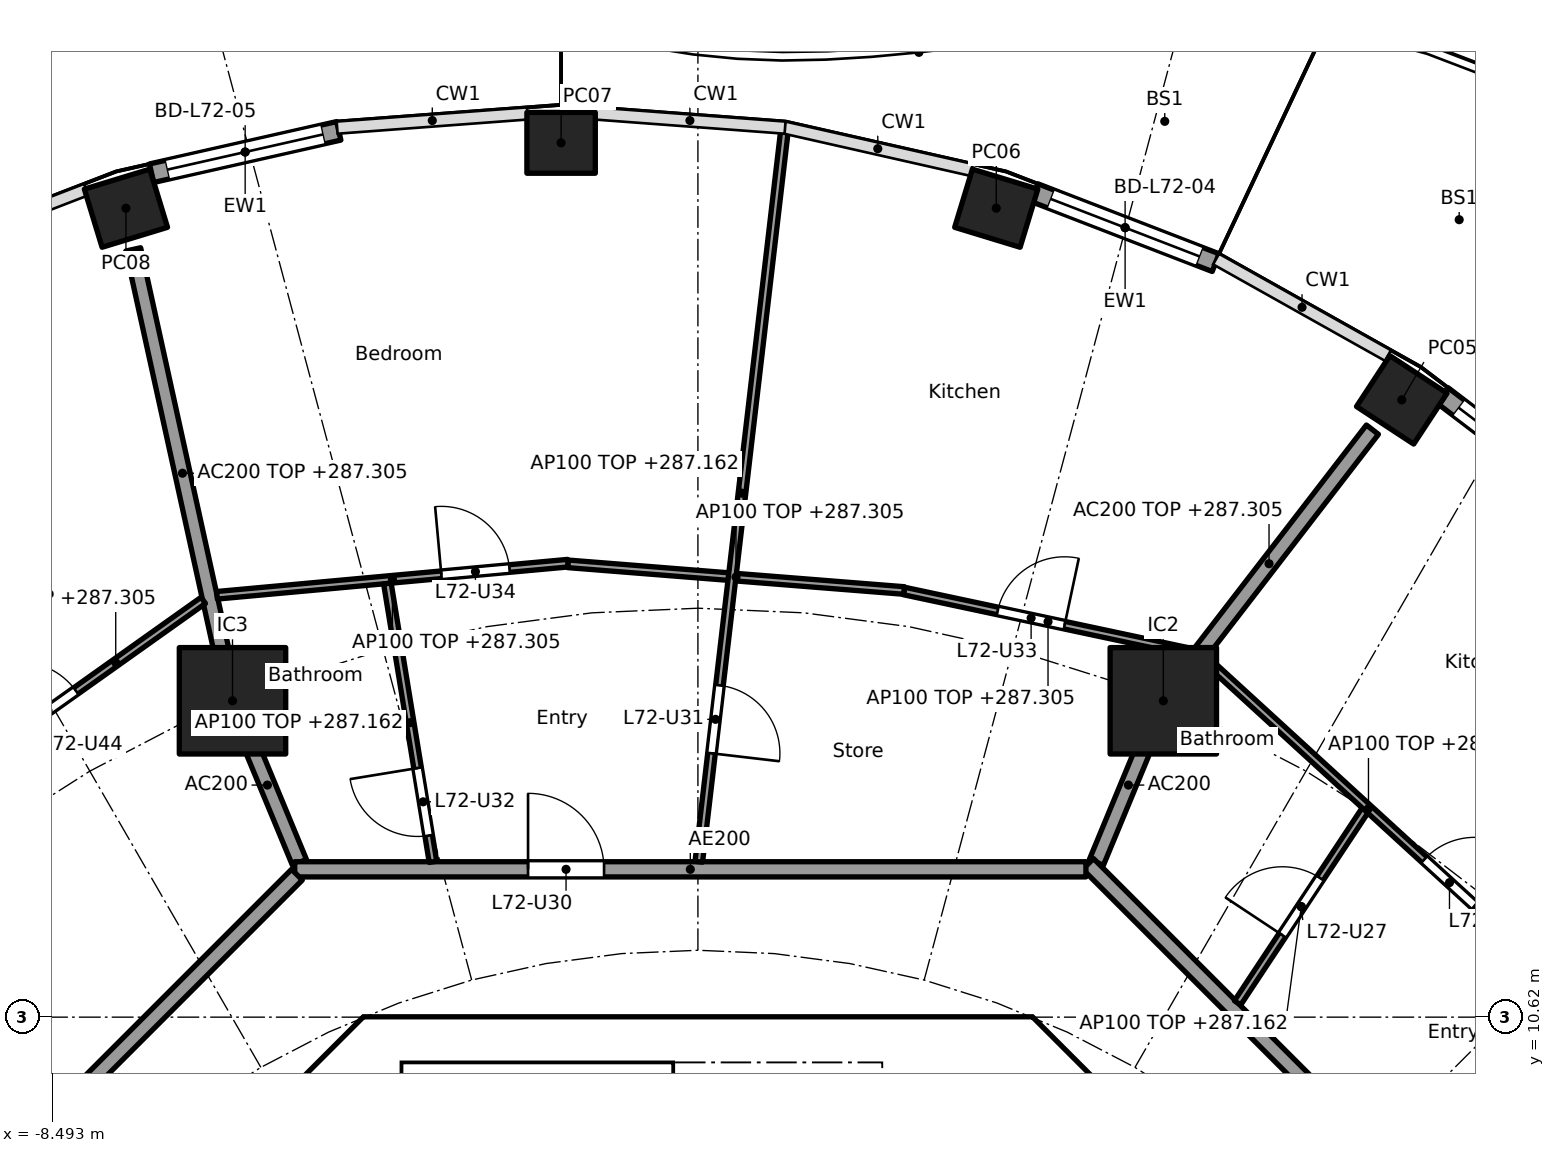
"""IFC4 building model, lengths in metres.
Left out: names, types, materials, properties, quantities, classifications, styles, units other than length and angle.
Written with IfcOpenShell. Run it as: python <this file> out.ifc"""

import sys

from ifc_helpers import new_model, si_unit, direction, frame, frame_2d, origin, origin_2d, place, context, subcontext, project, spatial, polyline, rectangle, hollow_rectangle, outline, extrude, element, fill, save


model = new_model("IFC4")
c1 = context("Model", 3, precision=1e-05, world=origin(), true_north=direction((0.0, 1.0)))
c2 = subcontext(c1, "Body", "Model", "MODEL_VIEW")
j1 = project(units=[si_unit("LENGTHUNIT", "METRE"), si_unit("PLANEANGLEUNIT", "RADIAN")], contexts=[c1])
p1 = place(None, origin())
s1 = spatial("IfcSite", under=j1, at=p1, CompositionType="ELEMENT")
p2 = place(p1, origin())
s2 = spatial("IfcBuilding", under=s1, at=p2, CompositionType="ELEMENT")
p3 = place(p2, frame((0.0, 0.0, 284.4)))
s3 = spatial("IfcBuildingStorey", under=s2, at=p3, CompositionType="ELEMENT", Elevation=284.4)
for number, where, z_axis, x_axis in (
    (1, (9.26, 18.741, 0.0), (0.0, 0.0, 1.0), (-0.836, 0.549, 0.0)),
    (2, (3.925, 21.262, 0.0), (0.0, 0.0, 1.0), (-0.957, 0.292, 0.0)),
    (3, (-1.8, 22.122, 0.0), (0.0, 0.0, 1.0), (-1.0, 0.0, 0.0)),
    (4, (-7.525, 21.262, 0.0), (0.0, 0.0, 1.0), (-0.957, -0.292, 0.0)),
):
    element("IfcColumn", number, at=place(p3, frame(where, z_axis=z_axis, x_axis=x_axis)), inside=s3, PredefinedType="COLUMN", context=c2, shape_type="SweptSolid", body=[
        extrude(hollow_rectangle(XDim=0.9, YDim=0.8, WallThickness=0.028, at=origin_2d()), origin(), (0.0, 0.0, 1.0), 3.7),
    ])
for number, where, z_axis, x_axis in (
    (5, (6.123, 14.782, 0.0), (0.0, 0.0, 1.0), (1.0, 0.0, 0.0)),
    (6, (-6.123, 14.782, 0.0), (0.0, 0.0, 1.0), (1.0, 0.0, 0.0)),
):
    element("IfcColumn", number, at=place(p3, frame(where, z_axis=z_axis, x_axis=x_axis)), inside=s3, PredefinedType="COLUMN", context=c2, shape_type="SweptSolid", body=[
        extrude(rectangle(XDim=1.4, YDim=1.4, at=origin_2d()), origin(), (0.0, 0.0, 1.0), 3.7),
    ])
p4 = place(p3, frame((9.792, 18.802, 0.0), z_axis=(0.0, 0.0, 1.0), x_axis=(0.796010739377, -0.605282498339, 0.0)))
e7 = element("IfcWall", 7, at=p4, inside=s3, PredefinedType="SOLIDWALL", context=c2, shape_type="SweptSolid", body=[
    extrude(rectangle(XDim=2.641, YDim=0.25, at=frame_2d((1.32, 0.0))), origin(), (0.0, 0.0, 1.0), 3.44),
])
p5 = place(p4, frame((0.27, 0.0, 0.0)))
e8 = element("IfcOpeningElement", 8, at=p5, cuts=e7, PredefinedType="OPENING", context=c2, shape_type="SweptSolid", body=[
    extrude(rectangle(XDim=2.1, YDim=2.4, at=frame_2d((1.05, 1.2))), frame((0.0, 0.135, 0.0), z_axis=(0.0, -1.0, 0.0), x_axis=(1.0, 0.0, 0.0)), (0.0, 0.0, 1.0), 0.27),
])
p6 = place(p3, frame((4.429, 21.467, 0.0), z_axis=(0.0, 0.0, 1.0), x_axis=(0.93282223778, -0.360336887792, 0.0)))
e9 = element("IfcWall", 9, at=p6, inside=s3, PredefinedType="SOLIDWALL", context=c2, shape_type="SweptSolid", body=[
    extrude(rectangle(XDim=2.554, YDim=0.25, at=frame_2d((1.277, 0.0))), origin(), (0.0, 0.0, 1.0), 3.44),
])
p7 = place(p6, frame((0.227, 0.0, 0.0)))
e10 = element("IfcOpeningElement", 10, at=p7, cuts=e9, PredefinedType="OPENING", context=c2, shape_type="SweptSolid", body=[
    extrude(rectangle(XDim=2.1, YDim=2.4, at=frame_2d((1.05, 1.2))), frame((0.0, 0.135, 0.0), z_axis=(0.0, -1.0, 0.0), x_axis=(1.0, 0.0, 0.0)), (0.0, 0.0, 1.0), 0.27),
])
p8 = place(p3, frame((-7.188, 21.723, 0.0), z_axis=(0.0, 0.0, 1.0), x_axis=(0.975319584032, 0.220797891756, 0.0)))
e11 = element("IfcWall", 11, at=p8, inside=s3, PredefinedType="SOLIDWALL", context=c2, shape_type="SweptSolid", body=[
    extrude(rectangle(XDim=2.525, YDim=0.25, at=frame_2d((1.263, 0.0))), origin(), (0.0, 0.0, 1.0), 3.44),
])
p9 = place(p8, frame((0.213, 0.0, 0.0)))
e12 = element("IfcOpeningElement", 12, at=p9, cuts=e11, PredefinedType="OPENING", context=c2, shape_type="SweptSolid", body=[
    extrude(rectangle(XDim=2.1, YDim=2.4, at=frame_2d((1.05, 1.2))), frame((0.0, 0.135, 0.0), z_axis=(0.0, -1.0, 0.0), x_axis=(1.0, 0.0, 0.0)), (0.0, 0.0, 1.0), 0.27),
])
p10 = place(p3, frame((9.988, 4.613, 0.0), z_axis=(0.0, 0.0, 1.0), x_axis=(-0.707106781187, 0.707106781187, 0.0)))
e13 = element("IfcWall", 13, at=p10, inside=s3, PredefinedType="SHEAR", context=c2, shape_type="SweptSolid", body=[
    extrude(rectangle(XDim=7.602, YDim=0.6, at=frame_2d((3.801, 0.0))), origin(), (0.0, 0.0, 1.0), 3.44),
])
p11 = place(p10, frame((3.201, 0.0, 0.0)))
e14 = element("IfcOpeningElement", 14, at=p11, cuts=e13, PredefinedType="OPENING", context=c2, shape_type="SweptSolid", body=[
    extrude(rectangle(XDim=1.2, YDim=2.1, at=frame_2d((0.6, 1.05))), frame((0.0, 0.31, 0.0), z_axis=(0.0, -1.0, 0.0), x_axis=(1.0, 0.0, 0.0)), (0.0, 0.0, 1.0), 0.62),
])
p12 = place(p3, frame((-4.613, 9.988, 0.0), z_axis=(0.0, 0.0, 1.0), x_axis=(-0.707106781187, -0.707106781187, 0.0)))
e15 = element("IfcWall", 15, at=p12, inside=s3, PredefinedType="SHEAR", context=c2, shape_type="SweptSolid", body=[
    extrude(rectangle(XDim=7.602, YDim=0.6, at=frame_2d((3.801, 0.0))), origin(), (0.0, 0.0, 1.0), 3.44),
])
p13 = place(p12, frame((0.351, 0.0, 0.0)))
e16 = element("IfcOpeningElement", 16, at=p13, cuts=e15, PredefinedType="OPENING", context=c2, shape_type="SweptSolid", body=[
    extrude(rectangle(XDim=1.1, YDim=2.1, at=frame_2d((0.55, 1.05))), frame((0.0, 0.31, 0.0), z_axis=(0.0, -1.0, 0.0), x_axis=(1.0, 0.0, 0.0)), (0.0, 0.0, 1.0), 0.62),
])
p14 = place(p3, frame((4.0, 7.025, 0.0), z_axis=(0.0, 0.0, 1.0), x_axis=(0.0, 1.0, 0.0)))
e17 = element("IfcWall", 17, at=p14, inside=s3, PredefinedType="SOLIDWALL", context=c2, shape_type="SweptSolid", body=[
    extrude(rectangle(XDim=3.0, YDim=0.2, at=frame_2d((1.5, 0.0))), origin(), (0.0, 0.0, 1.0), 3.44),
])
p15 = place(p14, frame((0.925, 0.0, 0.0)))
e18 = element("IfcOpeningElement", 18, at=p15, cuts=e17, PredefinedType="OPENING", context=c2, shape_type="SweptSolid", body=[
    extrude(rectangle(XDim=1.1, YDim=2.1, at=frame_2d((0.55, 1.05))), frame((0.0, 0.11, 0.0), z_axis=(0.0, -1.0, 0.0), x_axis=(1.0, 0.0, 0.0)), (0.0, 0.0, 1.0), 0.22),
])
p16 = place(p3, origin())
e19 = element("IfcWall", 19, at=p16, inside=s3, PredefinedType="SHEAR", context=c2, shape_type="SweptSolid", body=[
    extrude(outline(polyline([(-4.152, 10.025), (-4.401, 9.776), (-4.825, 10.2), (-4.401, 10.625), (4.401, 10.625), (4.825, 10.2), (4.401, 9.776), (4.152, 10.025), (-4.152, 10.025)])), origin(), (0.0, 0.0, 1.0), 3.44),
])
p17 = place(p3, origin())
e20 = element("IfcWall", 20, at=p17, inside=s3, PredefinedType="SOLIDWALL", context=c2, shape_type="SweptSolid", body=[
    extrude(outline(polyline([(-3.9, 7.025), (-4.1, 7.025), (-4.1, 10.025), (-3.9, 10.025), (-3.9, 7.025)])), origin(), (0.0, 0.0, 1.0), 3.44),
])
p18 = place(p3, frame((5.243, 12.657, 0.0), z_axis=(0.0, 0.0, 1.0), x_axis=(0.382691608661, 0.923876145736, 0.0)))
e21 = element("IfcWall", 21, at=p18, inside=s3, PredefinedType="PARTITIONING", context=c2, shape_type="SweptSolid", body=[
    extrude(rectangle(XDim=2.2, YDim=0.2, at=frame_2d((1.1, 0.0))), origin(), (0.0, 0.0, 1.0), 3.44),
])
p19 = place(p3, frame((6.154, 14.822, 0.0), z_axis=(0.0, 0.0, 1.0), x_axis=(0.610687612043, 0.791871606068, 0.0)))
e22 = element("IfcWall", 22, at=p19, inside=s3, PredefinedType="PARTITIONING", context=c2, shape_type="SweptSolid", body=[
    extrude(rectangle(XDim=4.455, YDim=0.2, at=frame_2d((2.228, 0.0))), origin(), (0.0, 0.0, 1.0), 2.905),
])
p20 = place(p3, frame((-5.243, 12.657, 0.0), z_axis=(0.0, 0.0, 1.0), x_axis=(-0.38273085373, 0.923859888513, 0.0)))
e23 = element("IfcWall", 23, at=p20, inside=s3, PredefinedType="PARTITIONING", context=c2, shape_type="SweptSolid", body=[
    extrude(rectangle(XDim=2.199, YDim=0.2, at=frame_2d((1.1, 0.0))), origin(), (0.0, 0.0, 1.0), 3.44),
])
p21 = place(p3, frame((-6.134, 14.831, 0.0), z_axis=(0.0, 0.0, 1.0), x_axis=(-0.214842475666, 0.976648714047, 0.0)))
e24 = element("IfcWall", 24, at=p21, inside=s3, PredefinedType="PARTITIONING", context=c2, shape_type="SweptSolid", body=[
    extrude(rectangle(XDim=6.031, YDim=0.2, at=frame_2d((3.015, 0.0))), origin(), (0.0, 0.0, 1.0), 2.905),
])
p22 = place(p3, frame((12.635, 5.134, 0.0), z_axis=(0.0, 0.0, 1.0), x_axis=(-0.707106781187, 0.707106781187, 0.0)))
e25 = element("IfcWall", 25, at=p22, inside=s3, PredefinedType="PARTITIONING", context=c2, shape_type="SweptSolid", body=[
    extrude(rectangle(XDim=10.609, YDim=0.2, at=frame_2d((5.305, 0.0))), origin(), (0.0, 0.0, 1.0), 3.44),
])
p23 = place(p22, frame((4.804, 0.0, 0.0)))
e26 = element("IfcOpeningElement", 26, at=p23, cuts=e25, PredefinedType="OPENING", context=c2, shape_type="SweptSolid", body=[
    extrude(rectangle(XDim=1.0, YDim=2.1, at=frame_2d((0.5, 1.05))), frame((0.0, 0.11, 0.0), z_axis=(0.0, -1.0, 0.0), x_axis=(1.0, 0.0, 0.0)), (0.0, 0.0, 1.0), 0.22),
])
p24 = place(p3, frame((5.104, 12.565, 0.0), z_axis=(0.0, 0.0, 1.0), x_axis=(-1.0, 0.0, 0.0)))
e27 = element("IfcWall", 27, at=p24, inside=s3, PredefinedType="PARTITIONING", context=c2, shape_type="SweptSolid", body=[
    extrude(rectangle(XDim=10.409, YDim=0.2, at=frame_2d((5.205, 0.0))), origin(), (0.0, 0.0, 1.0), 3.44),
])
p25 = place(p24, frame((6.339, 0.0, 0.0)))
e28 = element("IfcOpeningElement", 28, at=p25, cuts=e27, PredefinedType="OPENING", context=c2, shape_type="SweptSolid", body=[
    extrude(rectangle(XDim=1.0, YDim=2.1, at=frame_2d((0.5, 1.05))), frame((0.0, 0.11, 0.0), z_axis=(0.0, -1.0, 0.0), x_axis=(1.0, 0.0, 0.0)), (0.0, 0.0, 1.0), 0.22),
])
p26 = place(p3, frame((-5.275, 12.494, 0.0), z_axis=(0.0, 0.0, 1.0), x_axis=(-0.707106781187, -0.707106781187, 0.0)))
e29 = element("IfcWall", 29, at=p26, inside=s3, PredefinedType="PARTITIONING", context=c2, shape_type="SweptSolid", body=[
    extrude(rectangle(XDim=10.209, YDim=0.2, at=frame_2d((5.104, 0.0))), origin(), (0.0, 0.0, 1.0), 3.44),
])
p27 = place(p3, frame((10.972, 11.398, 0.0), z_axis=(0.0, 0.0, 1.0), x_axis=(-0.737830272434, 0.674986288069, 0.0)))
e30 = element("IfcWall", 30, at=p27, inside=s3, PredefinedType="PARTITIONING", context=c2, shape_type="SweptSolid", body=[
    extrude(rectangle(XDim=5.827, YDim=0.1, at=frame_2d((2.914, 0.0))), origin(), (0.0, 0.0, 1.0), 2.905),
])
p28 = place(p27, frame((1.019, 0.0, 0.0)))
e31 = element("IfcOpeningElement", 31, at=p28, cuts=e30, PredefinedType="OPENING", context=c2, shape_type="SweptSolid", body=[
    extrude(rectangle(XDim=0.9, YDim=2.1, at=frame_2d((0.45, 1.05))), frame((0.0, 0.06, 0.0), z_axis=(0.0, -1.0, 0.0), x_axis=(1.0, 0.0, 0.0)), (0.0, 0.0, 1.0), 0.12),
])
p29 = place(p3, frame((7.1, 10.808, 0.0), z_axis=(0.0, 0.0, 1.0), x_axis=(0.55204370542, 0.833815175747, 0.0)))
e32 = element("IfcWall", 32, at=p29, inside=s3, PredefinedType="PARTITIONING", context=c2, shape_type="SweptSolid", body=[
    extrude(rectangle(XDim=3.036, YDim=0.1, at=frame_2d((1.518, 0.0))), origin(), (0.0, 0.0, 1.0), 2.762),
])
p30 = place(p29, frame((1.068, 0.0, 0.0)))
e33 = element("IfcOpeningElement", 33, at=p30, cuts=e32, PredefinedType="OPENING", context=c2, shape_type="SweptSolid", body=[
    extrude(rectangle(XDim=0.9, YDim=2.1, at=frame_2d((0.45, 1.05))), frame((0.0, 0.06, 0.0), z_axis=(0.0, -1.0, 0.0), x_axis=(1.0, 0.0, 0.0)), (0.0, 0.0, 1.0), 0.12),
])
p31 = place(p3, frame((6.5, 15.419, 0.0), z_axis=(0.0, 0.0, 1.0), x_axis=(-0.978053492557, 0.208353943321, 0.0)))
e34 = element("IfcWall", 34, at=p31, inside=s3, PredefinedType="PARTITIONING", context=c2, shape_type="SweptSolid", body=[
    extrude(rectangle(XDim=3.874, YDim=0.1, at=frame_2d((1.937, 0.0))), origin(), (0.0, 0.0, 1.0), 2.905),
])
p32 = place(p31, frame((1.714, 0.0, 0.0)))
e35 = element("IfcOpeningElement", 35, at=p32, cuts=e34, PredefinedType="OPENING", context=c2, shape_type="SweptSolid", body=[
    extrude(rectangle(XDim=0.9, YDim=2.1, at=frame_2d((0.45, 1.05))), frame((0.0, 0.06, 0.0), z_axis=(0.0, -1.0, 0.0), x_axis=(1.0, 0.0, 0.0)), (0.0, 0.0, 1.0), 0.12),
])
p33 = place(p3, frame((2.713, 16.233, 0.0), z_axis=(0.0, 0.0, 1.0), x_axis=(-0.996870142942, 0.079056423588, 0.0)))
e36 = element("IfcWall", 36, at=p33, inside=s3, PredefinedType="PARTITIONING", context=c2, shape_type="SweptSolid", body=[
    extrude(rectangle(XDim=4.438, YDim=0.1, at=frame_2d((2.219, 0.0))), origin(), (0.0, 0.0, 1.0), 2.905),
])
p34 = place(p3, frame((0.012, 12.664, 0.0), z_axis=(0.0, 0.0, 1.0), x_axis=(0.11636251357, 0.993206808996, 0.0)))
e37 = element("IfcWall", 37, at=p34, inside=s3, PredefinedType="PARTITIONING", context=c2, shape_type="SweptSolid", body=[
    extrude(rectangle(XDim=9.765, YDim=0.1, at=frame_2d((4.882, 0.0))), origin(), (0.0, 0.0, 1.0), 2.762),
])
p35 = place(p34, frame((1.437, 0.0, 0.0)))
e38 = element("IfcOpeningElement", 38, at=p35, cuts=e37, PredefinedType="OPENING", context=c2, shape_type="SweptSolid", body=[
    extrude(rectangle(XDim=0.9, YDim=2.1, at=frame_2d((0.45, 1.05))), frame((0.0, 0.06, 0.0), z_axis=(0.0, -1.0, 0.0), x_axis=(1.0, 0.0, 0.0)), (0.0, 0.0, 1.0), 0.12),
])
p36 = place(p3, frame((-1.711, 16.592, 0.0), z_axis=(0.0, 0.0, 1.0), x_axis=(-0.995843837247, -0.091077175065, 0.0)))
e39 = element("IfcWall", 39, at=p36, inside=s3, PredefinedType="PARTITIONING", context=c2, shape_type="SweptSolid", body=[
    extrude(rectangle(XDim=4.635, YDim=0.1, at=frame_2d((2.317, 0.0))), origin(), (0.0, 0.0, 1.0), 2.905),
])
p37 = place(p36, frame((0.771, 0.0, 0.0)))
e40 = element("IfcOpeningElement", 40, at=p37, cuts=e39, PredefinedType="OPENING", context=c2, shape_type="SweptSolid", body=[
    extrude(rectangle(XDim=0.9, YDim=2.1, at=frame_2d((0.45, 1.05))), frame((0.0, 0.06, 0.0), z_axis=(0.0, -1.0, 0.0), x_axis=(1.0, 0.0, 0.0)), (0.0, 0.0, 1.0), 0.12),
])
p38 = place(p3, frame((-3.486, 12.663, 0.0), z_axis=(0.0, 0.0, 1.0), x_axis=(-0.161602751674, 0.986855891532, 0.0)))
e41 = element("IfcWall", 41, at=p38, inside=s3, PredefinedType="PARTITIONING", context=c2, shape_type="SweptSolid", body=[
    extrude(rectangle(XDim=3.71, YDim=0.1, at=frame_2d((1.855, 0.0))), origin(), (0.0, 0.0, 1.0), 2.762),
])
p39 = place(p38, frame((0.35, 0.0, 0.0)))
e42 = element("IfcOpeningElement", 42, at=p39, cuts=e41, PredefinedType="OPENING", context=c2, shape_type="SweptSolid", body=[
    extrude(rectangle(XDim=0.9, YDim=2.1, at=frame_2d((0.45, 1.05))), frame((0.0, 0.06, 0.0), z_axis=(0.0, -1.0, 0.0), x_axis=(1.0, 0.0, 0.0)), (0.0, 0.0, 1.0), 0.12),
])
p40 = place(p3, frame((-6.508, 16.103, 0.0), z_axis=(0.0, 0.0, 1.0), x_axis=(-0.815202203556, -0.579176456114, 0.0)))
e43 = element("IfcWall", 43, at=p40, inside=s3, PredefinedType="PARTITIONING", context=c2, shape_type="SweptSolid", body=[
    extrude(rectangle(XDim=4.036, YDim=0.1, at=frame_2d((2.018, 0.0))), origin(), (0.0, 0.0, 1.0), 2.905),
])
p41 = place(p40, frame((2.055, 0.0, 0.0)))
e44 = element("IfcOpeningElement", 44, at=p41, cuts=e43, PredefinedType="OPENING", context=c2, shape_type="SweptSolid", body=[
    extrude(rectangle(XDim=0.9, YDim=2.1, at=frame_2d((0.45, 1.05))), frame((0.0, 0.06, 0.0), z_axis=(0.0, -1.0, 0.0), x_axis=(1.0, 0.0, 0.0)), (0.0, 0.0, 1.0), 0.12),
])
p42 = place(p5, origin())
e45 = element("IfcDoor", 45, at=p42, inside=s3, OperationType="SLIDING_TO_LEFT", PredefinedType="DOOR", context=c2, shape_type="SweptSolid", body=[
    extrude(rectangle(XDim=2.1, YDim=2.4, at=frame_2d((1.05, 1.2))), frame((0.0, 0.025, 0.0), z_axis=(0.0, -1.0, 0.0), x_axis=(1.0, 0.0, 0.0)), (0.0, 0.0, 1.0), 0.05),
])
fill(e8, e45)
p43 = place(p7, origin())
e46 = element("IfcDoor", 46, at=p43, inside=s3, OperationType="SLIDING_TO_LEFT", PredefinedType="DOOR", context=c2, shape_type="SweptSolid", body=[
    extrude(rectangle(XDim=2.1, YDim=2.4, at=frame_2d((1.05, 1.2))), frame((0.0, 0.025, 0.0), z_axis=(0.0, -1.0, 0.0), x_axis=(1.0, 0.0, 0.0)), (0.0, 0.0, 1.0), 0.05),
])
fill(e10, e46)
p44 = place(p9, origin())
e47 = element("IfcDoor", 47, at=p44, inside=s3, OperationType="SLIDING_TO_LEFT", PredefinedType="DOOR", context=c2, shape_type="SweptSolid", body=[
    extrude(rectangle(XDim=2.1, YDim=2.4, at=frame_2d((1.05, 1.2))), frame((0.0, 0.025, 0.0), z_axis=(0.0, -1.0, 0.0), x_axis=(1.0, 0.0, 0.0)), (0.0, 0.0, 1.0), 0.05),
])
fill(e12, e47)
p45 = place(p30, origin())
e48 = element("IfcDoor", 48, at=p45, inside=s3, OperationType="SINGLE_SWING_LEFT", PredefinedType="DOOR", context=c2, shape_type="SweptSolid", body=[
    extrude(rectangle(XDim=0.9, YDim=2.1, at=frame_2d((0.45, 1.05))), frame((0.0, 0.025, 0.0), z_axis=(0.0, -1.0, 0.0), x_axis=(1.0, 0.0, 0.0)), (0.0, 0.0, 1.0), 0.05),
])
fill(e33, e48)
p46 = place(p28, frame((0.9, 0.0, 0.0), x_axis=(-1.0, 0.0, 0.0)))
e49 = element("IfcDoor", 49, at=p46, inside=s3, OperationType="SINGLE_SWING_RIGHT", PredefinedType="DOOR", context=c2, shape_type="SweptSolid", body=[
    extrude(rectangle(XDim=0.9, YDim=2.1, at=frame_2d((0.45, 1.05))), frame((0.0, 0.025, 0.0), z_axis=(0.0, -1.0, 0.0), x_axis=(1.0, 0.0, 0.0)), (0.0, 0.0, 1.0), 0.05),
])
fill(e31, e49)
p47 = place(p25, frame((1.0, 0.0, 0.0), x_axis=(-1.0, 0.0, 0.0)))
e50 = element("IfcDoor", 50, at=p47, inside=s3, OperationType="SINGLE_SWING_LEFT", PredefinedType="DOOR", context=c2, shape_type="SweptSolid", body=[
    extrude(rectangle(XDim=1.0, YDim=2.1, at=frame_2d((0.5, 1.05))), frame((0.0, 0.025, 0.0), z_axis=(0.0, -1.0, 0.0), x_axis=(1.0, 0.0, 0.0)), (0.0, 0.0, 1.0), 0.05),
])
fill(e28, e50)
p48 = place(p35, frame((0.9, 0.0, 0.0), x_axis=(-1.0, 0.0, 0.0)))
e51 = element("IfcDoor", 51, at=p48, inside=s3, OperationType="SINGLE_SWING_RIGHT", PredefinedType="DOOR", context=c2, shape_type="SweptSolid", body=[
    extrude(rectangle(XDim=0.9, YDim=2.1, at=frame_2d((0.45, 1.05))), frame((0.0, 0.025, 0.0), z_axis=(0.0, -1.0, 0.0), x_axis=(1.0, 0.0, 0.0)), (0.0, 0.0, 1.0), 0.05),
])
fill(e38, e51)
p49 = place(p39, origin())
e52 = element("IfcDoor", 52, at=p49, inside=s3, OperationType="SINGLE_SWING_RIGHT", PredefinedType="DOOR", context=c2, shape_type="SweptSolid", body=[
    extrude(rectangle(XDim=0.9, YDim=2.1, at=frame_2d((0.45, 1.05))), frame((0.0, 0.025, 0.0), z_axis=(0.0, -1.0, 0.0), x_axis=(1.0, 0.0, 0.0)), (0.0, 0.0, 1.0), 0.05),
])
fill(e42, e52)
p50 = place(p32, frame((0.9, 0.0, 0.0), x_axis=(-1.0, 0.0, 0.0)))
e53 = element("IfcDoor", 53, at=p50, inside=s3, OperationType="SINGLE_SWING_RIGHT", PredefinedType="DOOR", context=c2, shape_type="SweptSolid", body=[
    extrude(rectangle(XDim=0.9, YDim=2.1, at=frame_2d((0.45, 1.05))), frame((0.0, 0.025, 0.0), z_axis=(0.0, -1.0, 0.0), x_axis=(1.0, 0.0, 0.0)), (0.0, 0.0, 1.0), 0.05),
])
fill(e35, e53)
p51 = place(p37, frame((0.9, 0.0, 0.0), x_axis=(-1.0, 0.0, 0.0)))
e54 = element("IfcDoor", 54, at=p51, inside=s3, OperationType="SINGLE_SWING_LEFT", PredefinedType="DOOR", context=c2, shape_type="SweptSolid", body=[
    extrude(rectangle(XDim=0.9, YDim=2.1, at=frame_2d((0.45, 1.05))), frame((0.0, 0.025, 0.0), z_axis=(0.0, -1.0, 0.0), x_axis=(1.0, 0.0, 0.0)), (0.0, 0.0, 1.0), 0.05),
])
fill(e40, e54)
p52 = place(p41, frame((0.9, 0.0, 0.0), x_axis=(-1.0, 0.0, 0.0)))
e55 = element("IfcDoor", 55, at=p52, inside=s3, OperationType="SINGLE_SWING_LEFT", PredefinedType="DOOR", context=c2, shape_type="SweptSolid", body=[
    extrude(rectangle(XDim=0.9, YDim=2.1, at=frame_2d((0.45, 1.05))), frame((0.0, 0.025, 0.0), z_axis=(0.0, -1.0, 0.0), x_axis=(1.0, 0.0, 0.0)), (0.0, 0.0, 1.0), 0.05),
])
fill(e44, e55)
save(model, sys.argv[1])
